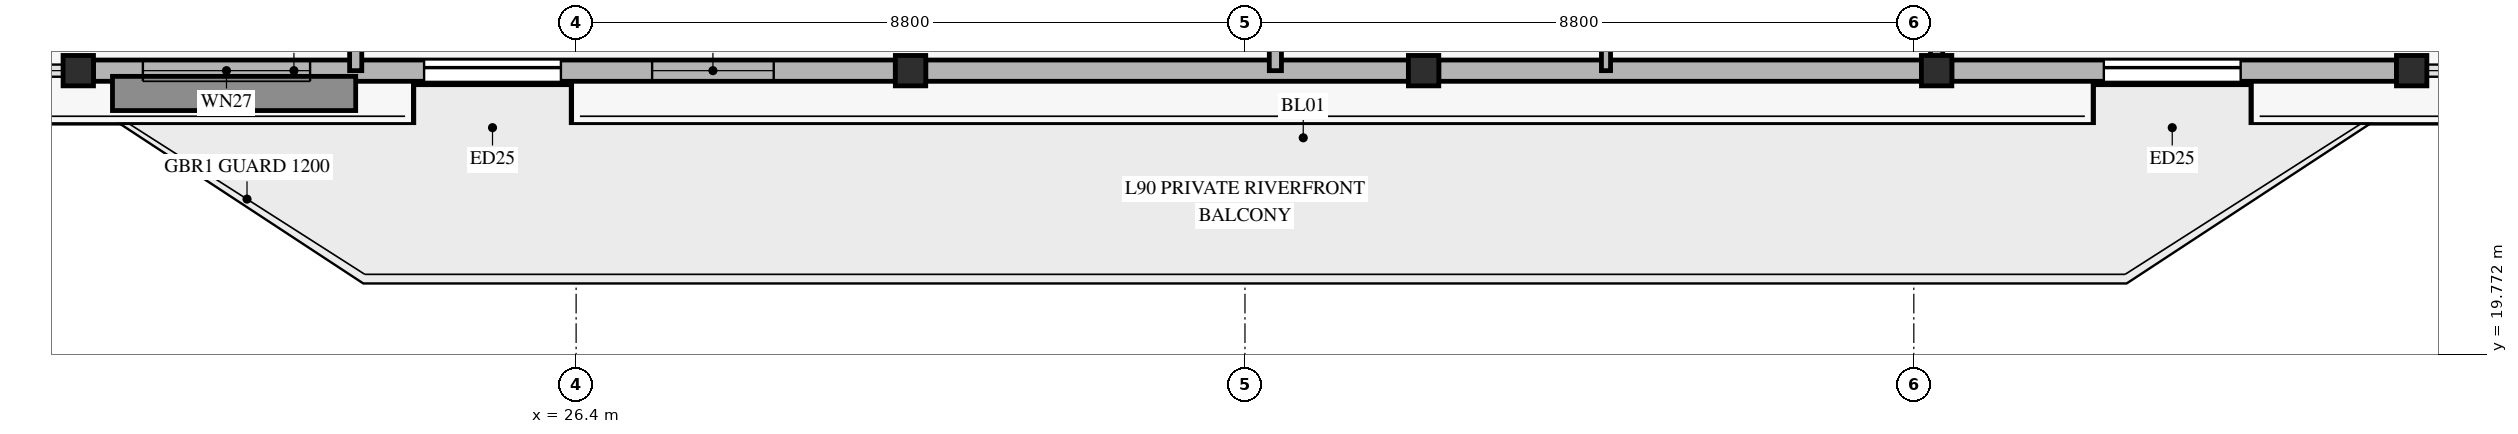
"""IFC4 building model, lengths in metres.
Left out: names, types, materials, properties, quantities, classifications, styles, units other than length and angle.
Written with IfcOpenShell. Run it as: python <this file> out.ifc"""

import sys

from ifc_helpers import new_model, si_unit, direction, frame, frame_2d, origin, origin_2d, place, context, subcontext, project, spatial, rectangle, hollow_rectangle, extrude, source, transform, mapped, element, fill, save


model = new_model("IFC4")
c1 = context("Model", 3, precision=1e-05, world=origin(), true_north=direction((0.0, 1.0)))
c2 = subcontext(c1, "Body", "Model", "MODEL_VIEW")
j1 = project(units=[si_unit("LENGTHUNIT", "METRE"), si_unit("PLANEANGLEUNIT", "RADIAN")], contexts=[c1])
p1 = place(None, origin())
s1 = spatial("IfcSite", under=j1, at=p1, CompositionType="ELEMENT")
p2 = place(p1, origin())
s2 = spatial("IfcBuilding", under=s1, at=p2, CompositionType="ELEMENT")
p3 = place(p2, frame((0.0, 0.0, 345.9)))
s3 = spatial("IfcBuildingStorey", under=s2, at=p3, CompositionType="ELEMENT", Elevation=345.9)
m1 = source(origin(), c2, "Body", "SweptSolid", [
    extrude(hollow_rectangle(XDim=0.4, YDim=0.4, WallThickness=0.02, at=origin_2d()), origin(), (0.0, 0.0, 1.0), 3.185),
])
for number, where, z_axis, x_axis in (
    (1, (19.85, 23.5, 0.0), (0.0, 0.0, 1.0), (1.0, 0.0, 0.0)),
    (2, (30.8, 23.5, 0.0), (0.0, 0.0, 1.0), (1.0, 0.0, 0.0)),
    (3, (37.55, 23.5, 0.0), (0.0, 0.0, 1.0), (1.0, 0.0, 0.0)),
    (4, (44.3, 23.5, 0.0), (0.0, 0.0, 1.0), (1.0, 0.0, 0.0)),
    (5, (50.55, 23.5, 0.0), (0.0, 0.0, 1.0), (1.0, 0.0, 0.0)),
):
    element("IfcColumn", number, at=place(p3, frame(where, z_axis=z_axis, x_axis=x_axis)), inside=s3, PredefinedType="COLUMN", context=c2, shape_type="MappedRepresentation", body=[
        mapped(m1, transform((0.0, 0.0, 0.0), x_axis=(1.0, 0.0, 0.0), y_axis=(0.0, 1.0, 0.0), z_axis=(0.0, 0.0, 1.0), scale=1.0)),
    ])
p4 = place(p3, frame((20.05, 23.5, 0.0), z_axis=(0.0, 0.0, 1.0), x_axis=(1.0, 0.0, 0.0)))
e6 = element("IfcWall", 6, at=p4, inside=s3, PredefinedType="SOLIDWALL", context=c2, shape_type="SweptSolid", body=[
    extrude(rectangle(XDim=10.55, YDim=0.28, at=frame_2d((5.275, 0.0))), origin(), (0.0, 0.0, 1.0), 2.815),
])
p5 = place(p4, frame((4.35, 0.0, 0.0)))
e7 = element("IfcOpeningElement", 7, at=p5, cuts=e6, PredefinedType="OPENING", context=c2, shape_type="SweptSolid", body=[
    extrude(rectangle(XDim=1.8, YDim=2.25, at=frame_2d((0.9, 1.125))), frame((0.0, 0.15, 0.0), z_axis=(0.0, -1.0, 0.0), x_axis=(1.0, 0.0, 0.0)), (0.0, 0.0, 1.0), 0.3),
])
p6 = place(p4, frame((0.65, 0.0, 0.45)))
e8 = element("IfcOpeningElement", 8, at=p6, cuts=e6, PredefinedType="OPENING", context=c2, shape_type="SweptSolid", body=[
    extrude(rectangle(XDim=2.2, YDim=2.1, at=frame_2d((1.1, 1.05))), frame((0.0, 0.15, 0.0), z_axis=(0.0, -1.0, 0.0), x_axis=(1.0, 0.0, 0.0)), (0.0, 0.0, 1.0), 0.3),
])
p7 = place(p4, frame((7.35, 0.0, 0.45)))
e9 = element("IfcOpeningElement", 9, at=p7, cuts=e6, PredefinedType="OPENING", context=c2, shape_type="SweptSolid", body=[
    extrude(rectangle(XDim=1.6, YDim=2.0, at=frame_2d((0.8, 1.0))), frame((0.0, 0.15, 0.0), z_axis=(0.0, -1.0, 0.0), x_axis=(1.0, 0.0, 0.0)), (0.0, 0.0, 1.0), 0.3),
])
for number, where, z_axis, x_axis in (
    (10, (31.0, 23.5, 0.0), (0.0, 0.0, 1.0), (1.0, 0.0, 0.0)),
    (11, (37.75, 23.5, 0.0), (0.0, 0.0, 1.0), (1.0, 0.0, 0.0)),
):
    element("IfcWall", number, at=place(p3, frame(where, z_axis=z_axis, x_axis=x_axis)), inside=s3, PredefinedType="SOLIDWALL", context=c2, shape_type="SweptSolid", body=[
        extrude(rectangle(XDim=6.35, YDim=0.28, at=frame_2d((3.175, 0.0))), origin(), (0.0, 0.0, 1.0), 2.815),
    ])
p8 = place(p3, frame((44.5, 23.5, 0.0), z_axis=(0.0, 0.0, 1.0), x_axis=(1.0, 0.0, 0.0)))
e12 = element("IfcWall", 12, at=p8, inside=s3, PredefinedType="SOLIDWALL", context=c2, shape_type="SweptSolid", body=[
    extrude(rectangle(XDim=5.85, YDim=0.28, at=frame_2d((2.925, 0.0))), origin(), (0.0, 0.0, 1.0), 2.815),
])
p9 = place(p8, frame((2.0, 0.0, 0.0)))
e13 = element("IfcOpeningElement", 13, at=p9, cuts=e12, PredefinedType="OPENING", context=c2, shape_type="SweptSolid", body=[
    extrude(rectangle(XDim=1.8, YDim=2.25, at=frame_2d((0.9, 1.125))), frame((0.0, 0.15, 0.0), z_axis=(0.0, -1.0, 0.0), x_axis=(1.0, 0.0, 0.0)), (0.0, 0.0, 1.0), 0.3),
])
p10 = place(p3, frame((23.5, 23.5, 0.0), z_axis=(0.0, 0.0, 1.0), x_axis=(0.0, 1.0, 0.0)))
e14 = element("IfcWall", 14, at=p10, inside=s3, PredefinedType="PARTITIONING", context=c2, shape_type="SweptSolid", body=[
    extrude(rectangle(XDim=13.95, YDim=0.16, at=frame_2d((6.975, 0.0))), origin(), (0.0, 0.0, 1.0), 2.77),
])
p11 = place(p10, frame((11.42, 0.0, 0.0)))
e15 = element("IfcOpeningElement", 15, at=p11, cuts=e14, PredefinedType="OPENING", context=c2, shape_type="SweptSolid", body=[
    extrude(rectangle(XDim=1.05, YDim=2.15, at=frame_2d((0.525, 1.075))), frame((0.0, 0.09, 0.0), z_axis=(0.0, -1.0, 0.0), x_axis=(1.0, 0.0, 0.0)), (0.0, 0.0, 1.0), 0.18),
])
p12 = place(p3, frame((35.6, 23.5, 0.0), z_axis=(0.0, 0.0, 1.0), x_axis=(0.0, 1.0, 0.0)))
e16 = element("IfcWall", 16, at=p12, inside=s3, PredefinedType="PARTITIONING", context=c2, shape_type="SweptSolid", body=[
    extrude(rectangle(XDim=11.0, YDim=0.16, at=frame_2d((5.5, 0.0))), origin(), (0.0, 0.0, 1.0), 2.77),
])
p13 = place(p3, frame((44.3, 23.5, 0.0), z_axis=(0.0, 0.0, 1.0), x_axis=(0.0, 1.0, 0.0)))
e17 = element("IfcWall", 17, at=p13, inside=s3, PredefinedType="PARTITIONING", context=c2, shape_type="SweptSolid", body=[
    extrude(rectangle(XDim=13.95, YDim=0.16, at=frame_2d((6.975, 0.0))), origin(), (0.0, 0.0, 1.0), 2.47),
])
p14 = place(p13, frame((11.42, 0.0, 0.0)))
e18 = element("IfcOpeningElement", 18, at=p14, cuts=e17, PredefinedType="OPENING", context=c2, shape_type="SweptSolid", body=[
    extrude(rectangle(XDim=1.05, YDim=2.15, at=frame_2d((0.525, 1.075))), frame((0.0, 0.09, 0.0), z_axis=(0.0, -1.0, 0.0), x_axis=(1.0, 0.0, 0.0)), (0.0, 0.0, 1.0), 0.18),
])
p15 = place(p3, frame((39.95, 23.5, 0.0), z_axis=(0.0, 0.0, 1.0), x_axis=(0.0, 1.0, 0.0)))
e19 = element("IfcWall", 19, at=p15, inside=s3, PredefinedType="PARTITIONING", context=c2, shape_type="SweptSolid", body=[
    extrude(rectangle(XDim=8.35, YDim=0.12, at=frame_2d((4.175, 0.0))), origin(), (0.0, 0.0, 1.0), 2.77),
])
p16 = place(p15, frame((1.72, 0.0, 0.0)))
e20 = element("IfcOpeningElement", 20, at=p16, cuts=e19, PredefinedType="OPENING", context=c2, shape_type="SweptSolid", body=[
    extrude(rectangle(XDim=0.95, YDim=2.1, at=frame_2d((0.475, 1.05))), frame((0.0, 0.07, 0.0), z_axis=(0.0, -1.0, 0.0), x_axis=(1.0, 0.0, 0.0)), (0.0, 0.0, 1.0), 0.14),
])
m2 = source(origin(), c2, "Body", "SweptSolid", [
    extrude(rectangle(XDim=1.8, YDim=2.25, at=frame_2d((0.9, 1.125))), frame((0.0, 0.025, 0.0), z_axis=(0.0, -1.0, 0.0), x_axis=(1.0, 0.0, 0.0)), (0.0, 0.0, 1.0), 0.05),
])
p17 = place(p5, origin())
e21 = element("IfcDoor", 21, at=p17, inside=s3, OperationType="SLIDING_TO_LEFT", PredefinedType="DOOR", context=c2, shape_type="MappedRepresentation", body=[
    mapped(m2, transform((0.0, 0.0, 0.0), x_axis=(1.0, 0.0, 0.0), y_axis=(0.0, 1.0, 0.0), z_axis=(0.0, 0.0, 1.0), scale=1.0)),
])
fill(e7, e21)
m3 = source(origin(), c2, "Body", "SweptSolid", [
    extrude(rectangle(XDim=2.2, YDim=2.1, at=frame_2d((1.1, 1.05))), frame((0.0, 0.03, 0.0), z_axis=(0.0, -1.0, 0.0), x_axis=(1.0, 0.0, 0.0)), (0.0, 0.0, 1.0), 0.06),
])
p18 = place(p6, origin())
e22 = element("IfcWindow", 22, at=p18, inside=s3, PartitioningType="SINGLE_PANEL", PredefinedType="WINDOW", context=c2, shape_type="MappedRepresentation", body=[
    mapped(m3, transform((0.0, 0.0, 0.0), x_axis=(1.0, 0.0, 0.0), y_axis=(0.0, 1.0, 0.0), z_axis=(0.0, 0.0, 1.0), scale=1.0)),
])
fill(e8, e22)
m4 = source(origin(), c2, "Body", "SweptSolid", [
    extrude(rectangle(XDim=1.6, YDim=2.0, at=frame_2d((0.8, 1.0))), frame((0.0, 0.03, 0.0), z_axis=(0.0, -1.0, 0.0), x_axis=(1.0, 0.0, 0.0)), (0.0, 0.0, 1.0), 0.06),
])
p19 = place(p7, origin())
e23 = element("IfcWindow", 23, at=p19, inside=s3, PartitioningType="SINGLE_PANEL", PredefinedType="WINDOW", context=c2, shape_type="MappedRepresentation", body=[
    mapped(m4, transform((0.0, 0.0, 0.0), x_axis=(1.0, 0.0, 0.0), y_axis=(0.0, 1.0, 0.0), z_axis=(0.0, 0.0, 1.0), scale=1.0)),
])
fill(e9, e23)
p20 = place(p9, origin())
e24 = element("IfcDoor", 24, at=p20, inside=s3, OperationType="SLIDING_TO_LEFT", PredefinedType="DOOR", context=c2, shape_type="MappedRepresentation", body=[
    mapped(m2, transform((0.0, 0.0, 0.0), x_axis=(1.0, 0.0, 0.0), y_axis=(0.0, 1.0, 0.0), z_axis=(0.0, 0.0, 1.0), scale=1.0)),
])
fill(e13, e24)
save(model, sys.argv[1])
